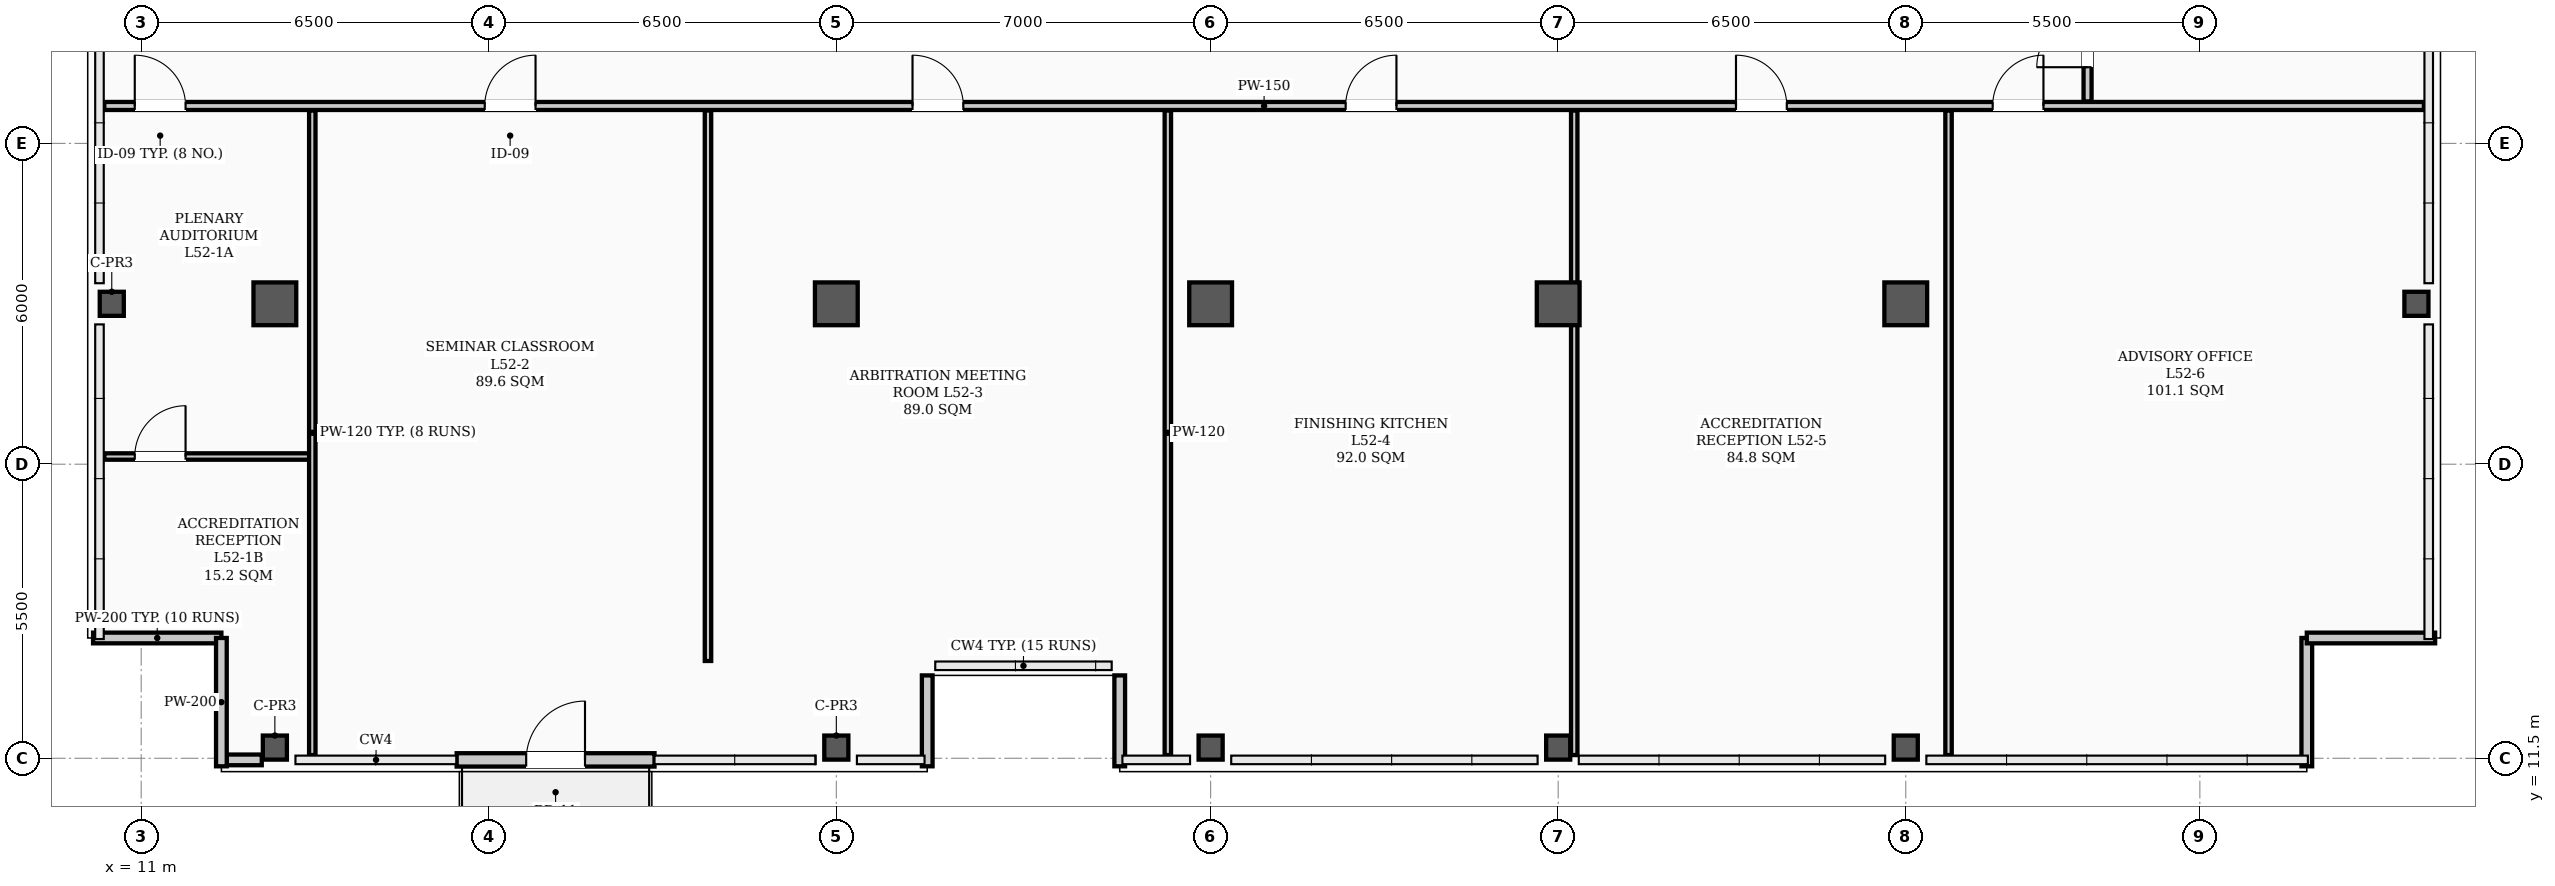
"""IFC4 building model, lengths in metres.
Left out: names, types, materials, properties, quantities, classifications, styles, units other than length and angle.
Written with IfcOpenShell. Run it as: python <this file> out.ifc"""

import sys

from ifc_helpers import new_model, si_unit, direction, frame, frame_2d, origin, origin_2d, place, context, subcontext, project, spatial, rectangle, hollow_rectangle, extrude, element, fill, save


model = new_model("IFC4")
c1 = context("Model", 3, precision=1e-05, world=origin(), true_north=direction((0.0, 1.0)))
c2 = subcontext(c1, "Body", "Model", "MODEL_VIEW")
j1 = project(units=[si_unit("LENGTHUNIT", "METRE"), si_unit("PLANEANGLEUNIT", "RADIAN")], contexts=[c1])
p1 = place(None, origin())
s1 = spatial("IfcSite", under=j1, at=p1, CompositionType="ELEMENT")
p2 = place(p1, origin())
s2 = spatial("IfcBuilding", under=s1, at=p2, CompositionType="ELEMENT")
p3 = place(p2, frame((0.0, 0.0, 211.1)))
s3 = spatial("IfcBuildingStorey", under=s2, at=p3, CompositionType="ELEMENT", Elevation=211.1)
for number, where, z_axis, x_axis in (
    (1, (13.5, 20.0, 0.0), (0.0, 0.0, 1.0), (1.0, 0.0, 0.0)),
    (2, (24.0, 20.0, 0.0), (0.0, 0.0, 1.0), (1.0, 0.0, 0.0)),
    (3, (31.0, 20.0, 0.0), (0.0, 0.0, 1.0), (1.0, 0.0, 0.0)),
    (4, (37.5, 20.0, 0.0), (0.0, 0.0, 1.0), (1.0, 0.0, 0.0)),
    (5, (44.0, 20.0, 0.0), (0.0, 0.0, 1.0), (1.0, 0.0, 0.0)),
):
    element("IfcColumn", number, at=place(p3, frame(where, z_axis=z_axis, x_axis=x_axis)), inside=s3, PredefinedType="COLUMN", context=c2, shape_type="SweptSolid", body=[
        extrude(hollow_rectangle(XDim=0.8, YDim=0.8, WallThickness=0.032, InnerFilletRadius=0.016, OuterFilletRadius=0.048, at=origin_2d()), origin(), (0.0, 0.0, 1.0), 3.9),
    ])
for number, where, z_axis, x_axis in (
    (6, (10.45, 20.0, 0.0), (0.0, 0.0, 1.0), (1.0, 0.0, 0.0)),
    (7, (13.5, 11.7, 0.0), (0.0, 0.0, 1.0), (1.0, 0.0, 0.0)),
    (8, (24.0, 11.7, 0.0), (0.0, 0.0, 1.0), (1.0, 0.0, 0.0)),
    (9, (31.0, 11.7, 0.0), (0.0, 0.0, 1.0), (1.0, 0.0, 0.0)),
    (10, (37.5, 11.7, 0.0), (0.0, 0.0, 1.0), (1.0, 0.0, 0.0)),
    (11, (44.0, 11.7, 0.0), (0.0, 0.0, 1.0), (1.0, 0.0, 0.0)),
    (12, (53.55, 20.0, 0.0), (0.0, 0.0, 1.0), (1.0, 0.0, 0.0)),
):
    element("IfcColumn", number, at=place(p3, frame(where, z_axis=z_axis, x_axis=x_axis)), inside=s3, PredefinedType="COLUMN", context=c2, shape_type="SweptSolid", body=[
        extrude(hollow_rectangle(XDim=0.45, YDim=0.45, WallThickness=0.022, InnerFilletRadius=0.022, OuterFilletRadius=0.044, at=origin_2d()), origin(), (0.0, 0.0, 1.0), 3.9),
    ])
p4 = place(p3, frame((12.6, 11.47, 0.0), z_axis=(0.0, 0.0, 1.0), x_axis=(1.0, 0.0, 0.0)))
e13 = element("IfcWall", 13, at=p4, inside=s3, PredefinedType="PARAPET", context=c2, shape_type="SweptSolid", body=[
    extrude(rectangle(XDim=0.655, YDim=0.2, at=frame_2d((0.327, 0.0))), origin(), (0.0, 0.0, 1.0), 1.2),
])
for number, where, z_axis, x_axis in (
    (14, (10.1, 13.75, 0.0), (0.0, 0.0, 1.0), (1.0, 0.0, 0.0)),
    (15, (12.5, 13.75, 0.0), (0.0, 0.0, 1.0), (0.0, -1.0, 0.0)),
    (16, (51.5, 11.35, 0.0), (0.0, 0.0, 1.0), (0.0, 1.0, 0.0)),
    (17, (51.5, 13.75, 0.0), (0.0, 0.0, 1.0), (1.0, 0.0, 0.0)),
):
    element("IfcWall", number, at=place(p3, frame(where, z_axis=z_axis, x_axis=x_axis)), inside=s3, PredefinedType="PARAPET", context=c2, shape_type="SweptSolid", body=[
        extrude(rectangle(XDim=2.4, YDim=0.2, at=frame_2d((1.2, 0.0))), origin(), (0.0, 0.0, 1.0), 1.2),
    ])
for number, where, z_axis, x_axis in (
    (18, (25.7, 11.35, 0.0), (0.0, 0.0, 1.0), (0.0, 1.0, 0.0)),
    (19, (29.3, 13.05, 0.0), (0.0, 0.0, 1.0), (0.0, -1.0, 0.0)),
):
    element("IfcWall", number, at=place(p3, frame(where, z_axis=z_axis, x_axis=x_axis)), inside=s3, PredefinedType="PARAPET", context=c2, shape_type="SweptSolid", body=[
        extrude(rectangle(XDim=1.7, YDim=0.2, at=frame_2d((0.85, 0.0))), origin(), (0.0, 0.0, 1.0), 1.2),
    ])
p5 = place(p3, frame((16.9, 11.47, 0.0), z_axis=(0.0, 0.0, 1.0), x_axis=(1.0, 0.0, 0.0)))
e20 = element("IfcWall", 20, at=p5, inside=s3, PredefinedType="STANDARD", context=c2, shape_type="SweptSolid", body=[
    extrude(rectangle(XDim=3.7, YDim=0.25, at=frame_2d((1.85, 0.0))), origin(), (0.0, 0.0, 1.0), 3.18),
])
p6 = place(p5, frame((1.3, 0.0, 0.0)))
e21 = element("IfcOpeningElement", 21, at=p6, cuts=e20, PredefinedType="OPENING", context=c2, shape_type="SweptSolid", body=[
    extrude(rectangle(XDim=1.1, YDim=2.2, at=frame_2d((0.55, 1.1))), frame((0.0, 0.135, 0.0), z_axis=(0.0, -1.0, 0.0), x_axis=(1.0, 0.0, 0.0)), (0.0, 0.0, 1.0), 0.27),
])
p7 = place(p3, frame((10.31, 23.7, 0.0), z_axis=(0.0, 0.0, 1.0), x_axis=(1.0, 0.0, 0.0)))
e22 = element("IfcWall", 22, at=p7, inside=s3, PredefinedType="PARTITIONING", context=c2, shape_type="SweptSolid", body=[
    extrude(rectangle(XDim=43.38, YDim=0.15, at=frame_2d((21.69, 0.0))), origin(), (0.0, 0.0, 1.0), 3.2),
])
p8 = place(p7, frame((0.57, 0.0, 0.0)))
e23 = element("IfcOpeningElement", 23, at=p8, cuts=e22, PredefinedType="OPENING", context=c2, shape_type="SweptSolid", body=[
    extrude(rectangle(XDim=0.95, YDim=2.08, at=frame_2d((0.475, 1.04))), frame((0.0, 0.085, 0.0), z_axis=(0.0, -1.0, 0.0), x_axis=(1.0, 0.0, 0.0)), (0.0, 0.0, 1.0), 0.17),
])
p9 = place(p7, frame((7.115, 0.0, 0.0)))
e24 = element("IfcOpeningElement", 24, at=p9, cuts=e22, PredefinedType="OPENING", context=c2, shape_type="SweptSolid", body=[
    extrude(rectangle(XDim=0.95, YDim=2.08, at=frame_2d((0.475, 1.04))), frame((0.0, 0.085, 0.0), z_axis=(0.0, -1.0, 0.0), x_axis=(1.0, 0.0, 0.0)), (0.0, 0.0, 1.0), 0.17),
])
p10 = place(p7, frame((15.115, 0.0, 0.0)))
e25 = element("IfcOpeningElement", 25, at=p10, cuts=e22, PredefinedType="OPENING", context=c2, shape_type="SweptSolid", body=[
    extrude(rectangle(XDim=0.95, YDim=2.08, at=frame_2d((0.475, 1.04))), frame((0.0, 0.085, 0.0), z_axis=(0.0, -1.0, 0.0), x_axis=(1.0, 0.0, 0.0)), (0.0, 0.0, 1.0), 0.17),
])
p11 = place(p7, frame((23.215, 0.0, 0.0)))
e26 = element("IfcOpeningElement", 26, at=p11, cuts=e22, PredefinedType="OPENING", context=c2, shape_type="SweptSolid", body=[
    extrude(rectangle(XDim=0.95, YDim=2.08, at=frame_2d((0.475, 1.04))), frame((0.0, 0.085, 0.0), z_axis=(0.0, -1.0, 0.0), x_axis=(1.0, 0.0, 0.0)), (0.0, 0.0, 1.0), 0.17),
])
p12 = place(p7, frame((30.515, 0.0, 0.0)))
e27 = element("IfcOpeningElement", 27, at=p12, cuts=e22, PredefinedType="OPENING", context=c2, shape_type="SweptSolid", body=[
    extrude(rectangle(XDim=0.95, YDim=2.08, at=frame_2d((0.475, 1.04))), frame((0.0, 0.085, 0.0), z_axis=(0.0, -1.0, 0.0), x_axis=(1.0, 0.0, 0.0)), (0.0, 0.0, 1.0), 0.17),
])
p13 = place(p7, frame((35.315, 0.0, 0.0)))
e28 = element("IfcOpeningElement", 28, at=p13, cuts=e22, PredefinedType="OPENING", context=c2, shape_type="SweptSolid", body=[
    extrude(rectangle(XDim=0.95, YDim=2.08, at=frame_2d((0.475, 1.04))), frame((0.0, 0.085, 0.0), z_axis=(0.0, -1.0, 0.0), x_axis=(1.0, 0.0, 0.0)), (0.0, 0.0, 1.0), 0.17),
])
p14 = place(p3, frame((10.31, 17.144, 0.0), z_axis=(0.0, 0.0, 1.0), x_axis=(1.0, 0.0, 0.0)))
e29 = element("IfcWall", 29, at=p14, inside=s3, PredefinedType="PARTITIONING", context=c2, shape_type="SweptSolid", body=[
    extrude(rectangle(XDim=3.89, YDim=0.12, at=frame_2d((1.945, 0.0))), origin(), (0.0, 0.0, 1.0), 3.2),
])
p15 = place(p14, frame((0.57, 0.0, 0.0)))
e30 = element("IfcOpeningElement", 30, at=p15, cuts=e29, PredefinedType="OPENING", context=c2, shape_type="SweptSolid", body=[
    extrude(rectangle(XDim=0.95, YDim=2.08, at=frame_2d((0.475, 1.04))), frame((0.0, 0.07, 0.0), z_axis=(0.0, -1.0, 0.0), x_axis=(1.0, 0.0, 0.0)), (0.0, 0.0, 1.0), 0.14),
])
p16 = place(p3, frame((47.4, 23.785, 0.0), z_axis=(0.0, 0.0, 1.0), x_axis=(0.0, 1.0, 0.0)))
e31 = element("IfcWall", 31, at=p16, inside=s3, PredefinedType="PARTITIONING", context=c2, shape_type="SweptSolid", body=[
    extrude(rectangle(XDim=13.13, YDim=0.15, at=frame_2d((6.565, 0.0))), origin(), (0.0, 0.0, 1.0), 3.1),
])
p17 = place(p16, frame((0.64, 0.0, 0.0)))
e32 = element("IfcOpeningElement", 32, at=p17, cuts=e31, PredefinedType="OPENING", context=c2, shape_type="SweptSolid", body=[
    extrude(rectangle(XDim=0.95, YDim=2.08, at=frame_2d((0.475, 1.04))), frame((0.0, 0.085, 0.0), z_axis=(0.0, -1.0, 0.0), x_axis=(1.0, 0.0, 0.0)), (0.0, 0.0, 1.0), 0.17),
])
p18 = place(p3, frame((14.2, 11.56, 0.0), z_axis=(0.0, 0.0, 1.0), x_axis=(0.0, 1.0, 0.0)))
e33 = element("IfcWall", 33, at=p18, inside=s3, PredefinedType="PARTITIONING", context=c2, shape_type="SweptSolid", body=[
    extrude(rectangle(XDim=12.055, YDim=0.12, at=frame_2d((6.027, 0.0))), origin(), (0.0, 0.0, 1.0), 3.1),
])
p19 = place(p3, frame((21.6, 13.32, 0.0), z_axis=(0.0, 0.0, 1.0), x_axis=(0.0, 1.0, 0.0)))
e34 = element("IfcWall", 34, at=p19, inside=s3, PredefinedType="PARTITIONING", context=c2, shape_type="SweptSolid", body=[
    extrude(rectangle(XDim=10.295, YDim=0.12, at=frame_2d((5.147, 0.0))), origin(), (0.0, 0.0, 1.0), 3.1),
])
for number, where, z_axis, x_axis in (
    (35, (30.2, 11.56, 0.0), (0.0, 0.0, 1.0), (0.0, 1.0, 0.0)),
    (36, (37.8, 11.56, 0.0), (0.0, 0.0, 1.0), (0.0, 1.0, 0.0)),
    (37, (44.8, 11.56, 0.0), (0.0, 0.0, 1.0), (0.0, 1.0, 0.0)),
):
    element("IfcWall", number, at=place(p3, frame(where, z_axis=z_axis, x_axis=x_axis)), inside=s3, PredefinedType="PARTITIONING", context=c2, shape_type="SweptSolid", body=[
        extrude(rectangle(XDim=12.055, YDim=0.12, at=frame_2d((6.027, 0.0))), origin(), (0.0, 0.0, 1.0), 3.1),
    ])
p20 = place(p6, origin())
e38 = element("IfcDoor", 38, at=p20, inside=s3, OperationType="SINGLE_SWING_RIGHT", PredefinedType="DOOR", context=c2, shape_type="SweptSolid", body=[
    extrude(rectangle(XDim=1.1, YDim=2.2, at=frame_2d((0.55, 1.1))), frame((0.0, 0.025, 0.0), z_axis=(0.0, -1.0, 0.0), x_axis=(1.0, 0.0, 0.0)), (0.0, 0.0, 1.0), 0.05),
])
fill(e21, e38)
p21 = place(p15, origin())
e39 = element("IfcDoor", 39, at=p21, inside=s3, OperationType="SINGLE_SWING_RIGHT", PredefinedType="DOOR", context=c2, shape_type="SweptSolid", body=[
    extrude(rectangle(XDim=0.95, YDim=2.08, at=frame_2d((0.475, 1.04))), frame((0.0, 0.025, 0.0), z_axis=(0.0, -1.0, 0.0), x_axis=(1.0, 0.0, 0.0)), (0.0, 0.0, 1.0), 0.05),
])
fill(e30, e39)
p22 = place(p8, origin())
e40 = element("IfcDoor", 40, at=p22, inside=s3, OperationType="SINGLE_SWING_LEFT", PredefinedType="DOOR", context=c2, shape_type="SweptSolid", body=[
    extrude(rectangle(XDim=0.95, YDim=2.08, at=frame_2d((0.475, 1.04))), frame((0.0, 0.025, 0.0), z_axis=(0.0, -1.0, 0.0), x_axis=(1.0, 0.0, 0.0)), (0.0, 0.0, 1.0), 0.05),
])
fill(e23, e40)
p23 = place(p9, origin())
e41 = element("IfcDoor", 41, at=p23, inside=s3, OperationType="SINGLE_SWING_RIGHT", PredefinedType="DOOR", context=c2, shape_type="SweptSolid", body=[
    extrude(rectangle(XDim=0.95, YDim=2.08, at=frame_2d((0.475, 1.04))), frame((0.0, 0.025, 0.0), z_axis=(0.0, -1.0, 0.0), x_axis=(1.0, 0.0, 0.0)), (0.0, 0.0, 1.0), 0.05),
])
fill(e24, e41)
p24 = place(p10, origin())
e42 = element("IfcDoor", 42, at=p24, inside=s3, OperationType="SINGLE_SWING_LEFT", PredefinedType="DOOR", context=c2, shape_type="SweptSolid", body=[
    extrude(rectangle(XDim=0.95, YDim=2.08, at=frame_2d((0.475, 1.04))), frame((0.0, 0.025, 0.0), z_axis=(0.0, -1.0, 0.0), x_axis=(1.0, 0.0, 0.0)), (0.0, 0.0, 1.0), 0.05),
])
fill(e25, e42)
p25 = place(p11, origin())
e43 = element("IfcDoor", 43, at=p25, inside=s3, OperationType="SINGLE_SWING_RIGHT", PredefinedType="DOOR", context=c2, shape_type="SweptSolid", body=[
    extrude(rectangle(XDim=0.95, YDim=2.08, at=frame_2d((0.475, 1.04))), frame((0.0, 0.025, 0.0), z_axis=(0.0, -1.0, 0.0), x_axis=(1.0, 0.0, 0.0)), (0.0, 0.0, 1.0), 0.05),
])
fill(e26, e43)
p26 = place(p12, origin())
e44 = element("IfcDoor", 44, at=p26, inside=s3, OperationType="SINGLE_SWING_LEFT", PredefinedType="DOOR", context=c2, shape_type="SweptSolid", body=[
    extrude(rectangle(XDim=0.95, YDim=2.08, at=frame_2d((0.475, 1.04))), frame((0.0, 0.025, 0.0), z_axis=(0.0, -1.0, 0.0), x_axis=(1.0, 0.0, 0.0)), (0.0, 0.0, 1.0), 0.05),
])
fill(e27, e44)
p27 = place(p13, origin())
e45 = element("IfcDoor", 45, at=p27, inside=s3, OperationType="SINGLE_SWING_RIGHT", PredefinedType="DOOR", context=c2, shape_type="SweptSolid", body=[
    extrude(rectangle(XDim=0.95, YDim=2.08, at=frame_2d((0.475, 1.04))), frame((0.0, 0.025, 0.0), z_axis=(0.0, -1.0, 0.0), x_axis=(1.0, 0.0, 0.0)), (0.0, 0.0, 1.0), 0.05),
])
fill(e28, e45)
p28 = place(p17, origin())
e46 = element("IfcDoor", 46, at=p28, inside=s3, OperationType="SINGLE_SWING_LEFT", PredefinedType="DOOR", context=c2, shape_type="SweptSolid", body=[
    extrude(rectangle(XDim=0.95, YDim=2.08, at=frame_2d((0.475, 1.04))), frame((0.0, 0.025, 0.0), z_axis=(0.0, -1.0, 0.0), x_axis=(1.0, 0.0, 0.0)), (0.0, 0.0, 1.0), 0.05),
])
fill(e32, e46)
save(model, sys.argv[1])
